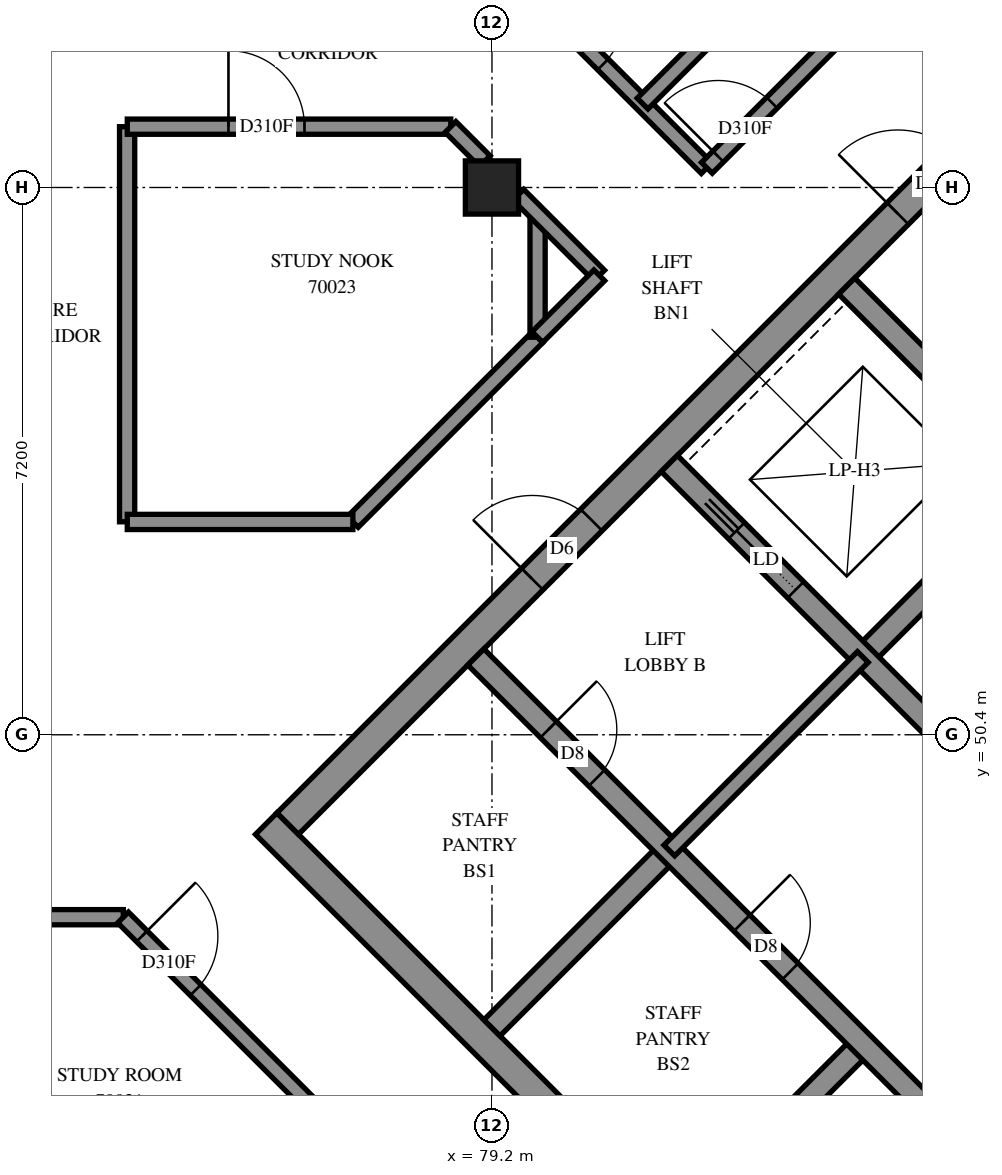
"""IFC4 building model, lengths in metres.
Left out: names, types, materials, properties, quantities, classifications, styles, units other than length and angle.
Written with IfcOpenShell. Run it as: python <this file> out.ifc"""

import sys

from ifc_helpers import new_model, si_unit, direction, frame, frame_2d, origin, origin_2d, place, context, subcontext, project, spatial, rectangle, extrude, element, fill, save


model = new_model("IFC4")
c1 = context("Model", 3, precision=1e-05, world=origin(), true_north=direction((0.0, 1.0)))
c2 = subcontext(c1, "Body", "Model", "MODEL_VIEW")
j1 = project(units=[si_unit("LENGTHUNIT", "METRE"), si_unit("PLANEANGLEUNIT", "RADIAN")], contexts=[c1])
p1 = place(None, origin())
s1 = spatial("IfcSite", under=j1, at=p1, CompositionType="ELEMENT")
p2 = place(p1, origin())
s2 = spatial("IfcBuilding", under=s1, at=p2, CompositionType="ELEMENT")
p3 = place(p2, frame((0.0, 0.0, 257.4)))
s3 = spatial("IfcBuildingStorey", under=s2, at=p3, CompositionType="ELEMENT", Elevation=257.4)
p4 = place(p3, frame((79.2, 57.6, 0.0), z_axis=(0.0, 0.0, 1.0), x_axis=(1.0, 0.0, 0.0)))
e1 = element("IfcColumn", 1, at=p4, inside=s3, PredefinedType="COLUMN", context=c2, shape_type="SweptSolid", body=[
    extrude(rectangle(XDim=0.7, YDim=0.7, at=origin_2d()), origin(), (0.0, 0.0, 1.0), 3.1),
])
p5 = place(p3, frame((76.23, 49.231, -0.3), z_axis=(0.0, 0.0, 1.0), x_axis=(0.7071034917, -0.7071100706, 0.0)))
e2 = element("IfcWall", 2, at=p5, inside=s3, PredefinedType="SHEAR", context=c2, shape_type="SweptSolid", body=[
    extrude(rectangle(XDim=15.2, YDim=0.4, at=frame_2d((7.6, 0.0))), origin(), (0.0, 0.0, 1.0), 2.7),
])
p6 = place(p3, frame((76.513, 49.231, -0.3), z_axis=(0.0, 0.0, 1.0), x_axis=(0.7071067812, 0.7071067812, 0.0)))
e3 = element("IfcWall", 3, at=p6, inside=s3, PredefinedType="SHEAR", context=c2, shape_type="SweptSolid", body=[
    extrude(rectangle(XDim=14.4, YDim=0.4, at=frame_2d((7.2, 0.0))), origin(), (0.0, 0.0, 1.0), 2.7),
])
p7 = place(p6, frame((4.55, 0.0, 0.3)))
e4 = element("IfcOpeningElement", 4, at=p7, cuts=e3, PredefinedType="OPENING", context=c2, shape_type="SweptSolid", body=[
    extrude(rectangle(XDim=1.1, YDim=2.1, at=frame_2d((0.55, 1.05))), frame((0.0, 0.21, 0.0), z_axis=(0.0, -1.0, 0.0), x_axis=(1.0, 0.0, 0.0)), (0.0, 0.0, 1.0), 0.42),
])
p8 = place(p6, frame((11.35, 0.0, 0.3)))
e5 = element("IfcOpeningElement", 5, at=p8, cuts=e3, PredefinedType="OPENING", context=c2, shape_type="SweptSolid", body=[
    extrude(rectangle(XDim=1.1, YDim=2.1, at=frame_2d((0.55, 1.05))), frame((0.0, 0.21, 0.0), z_axis=(0.0, -1.0, 0.0), x_axis=(1.0, 0.0, 0.0)), (0.0, 0.0, 1.0), 0.42),
])
for number, where, z_axis, x_axis in (
    (6, (79.2, 46.544, 0.0), (0.0, 0.0, 1.0), (0.707, 0.707, 0.0)),
    (7, (84.079, 51.423, 0.0), (0.0, 0.0, 1.0), (0.707, 0.707, 0.0)),
):
    element("IfcWall", number, at=place(p3, frame(where, z_axis=z_axis, x_axis=x_axis)), inside=s3, PredefinedType="SOLIDWALL", context=c2, shape_type="SweptSolid", body=[
        extrude(rectangle(XDim=3.3, YDim=0.3, at=frame_2d((1.65, 0.0))), origin(), (0.0, 0.0, 1.0), 3.1),
    ])
p9 = place(p3, frame((81.746, 43.999, 0.0), z_axis=(0.0, 0.0, 1.0), x_axis=(0.7071067812, 0.7071067812, 0.0)))
e8 = element("IfcWall", 8, at=p9, inside=s3, PredefinedType="SOLIDWALL", context=c2, shape_type="SweptSolid", body=[
    extrude(rectangle(XDim=3.3, YDim=0.3, at=frame_2d((1.65, 0.0))), origin(), (0.0, 0.0, 1.0), 3.1),
])
p10 = place(p3, frame((78.988, 51.423, 0.0), z_axis=(0.0, 0.0, 1.0), x_axis=(0.7071067812, -0.7071067812, 0.0)))
e9 = element("IfcWall", 9, at=p10, inside=s3, PredefinedType="SOLIDWALL", context=c2, shape_type="SweptSolid", body=[
    extrude(rectangle(XDim=14.4, YDim=0.3, at=frame_2d((7.2, 0.0))), origin(), (0.0, 0.0, 1.0), 3.1),
])
p11 = place(p10, frame((1.35, 0.0, 0.0)))
e10 = element("IfcOpeningElement", 10, at=p11, cuts=e9, PredefinedType="OPENING", context=c2, shape_type="SweptSolid", body=[
    extrude(rectangle(XDim=0.9, YDim=2.1, at=frame_2d((0.45, 1.05))), frame((0.0, 0.16, 0.0), z_axis=(0.0, -1.0, 0.0), x_axis=(1.0, 0.0, 0.0)), (0.0, 0.0, 1.0), 0.32),
])
p12 = place(p10, frame((4.95, 0.0, 0.0)))
e11 = element("IfcOpeningElement", 11, at=p12, cuts=e9, PredefinedType="OPENING", context=c2, shape_type="SweptSolid", body=[
    extrude(rectangle(XDim=0.9, YDim=2.1, at=frame_2d((0.45, 1.05))), frame((0.0, 0.16, 0.0), z_axis=(0.0, -1.0, 0.0), x_axis=(1.0, 0.0, 0.0)), (0.0, 0.0, 1.0), 0.32),
])
p13 = place(p10, frame((8.55, 0.0, 0.0)))
e12 = element("IfcOpeningElement", 12, at=p13, cuts=e9, PredefinedType="OPENING", context=c2, shape_type="SweptSolid", body=[
    extrude(rectangle(XDim=0.9, YDim=2.1, at=frame_2d((0.45, 1.05))), frame((0.0, 0.16, 0.0), z_axis=(0.0, -1.0, 0.0), x_axis=(1.0, 0.0, 0.0)), (0.0, 0.0, 1.0), 0.32),
])
p14 = place(p10, frame((12.05, 0.0, 0.0)))
e13 = element("IfcOpeningElement", 13, at=p14, cuts=e9, PredefinedType="OPENING", context=c2, shape_type="SweptSolid", body=[
    extrude(rectangle(XDim=1.1, YDim=2.1, at=frame_2d((0.55, 1.05))), frame((0.0, 0.16, 0.0), z_axis=(0.0, -1.0, 0.0), x_axis=(1.0, 0.0, 0.0)), (0.0, 0.0, 1.0), 0.32),
])
p15 = place(p3, frame((81.534, 53.969, 0.0), z_axis=(0.0, 0.0, 1.0), x_axis=(0.707103309, -0.7071102534, 0.0)))
e14 = element("IfcWall", 14, at=p15, inside=s3, PredefinedType="SOLIDWALL", context=c2, shape_type="SweptSolid", body=[
    extrude(rectangle(XDim=14.4, YDim=0.3, at=frame_2d((7.2, 0.0))), origin(), (0.0, 0.0, 1.0), 3.1),
])
p16 = place(p15, frame((8.55, 0.0, 0.0)))
e15 = element("IfcOpeningElement", 15, at=p16, cuts=e14, PredefinedType="OPENING", context=c2, shape_type="SweptSolid", body=[
    extrude(rectangle(XDim=0.9, YDim=2.1, at=frame_2d((0.45, 1.05))), frame((0.0, 0.16, 0.0), z_axis=(0.0, -1.0, 0.0), x_axis=(1.0, 0.0, 0.0)), (0.0, 0.0, 1.0), 0.32),
])
p17 = place(p15, frame((1.25, 0.0, 0.0)))
e16 = element("IfcOpeningElement", 16, at=p17, cuts=e14, PredefinedType="OPENING", context=c2, shape_type="SweptSolid", body=[
    extrude(rectangle(XDim=1.1, YDim=2.1, at=frame_2d((0.55, 1.05))), frame((0.0, 0.16, 0.0), z_axis=(0.0, -1.0, 0.0), x_axis=(1.0, 0.0, 0.0)), (0.0, 0.0, 1.0), 0.32),
])
p18 = place(p15, frame((4.85, 0.0, 0.0)))
e17 = element("IfcOpeningElement", 17, at=p18, cuts=e14, PredefinedType="OPENING", context=c2, shape_type="SweptSolid", body=[
    extrude(rectangle(XDim=1.1, YDim=2.1, at=frame_2d((0.55, 1.05))), frame((0.0, 0.16, 0.0), z_axis=(0.0, -1.0, 0.0), x_axis=(1.0, 0.0, 0.0)), (0.0, 0.0, 1.0), 0.32),
])
p19 = place(p15, frame((12.05, 0.0, 0.0)))
e18 = element("IfcOpeningElement", 18, at=p19, cuts=e14, PredefinedType="OPENING", context=c2, shape_type="SweptSolid", body=[
    extrude(rectangle(XDim=1.1, YDim=2.1, at=frame_2d((0.55, 1.05))), frame((0.0, 0.16, 0.0), z_axis=(0.0, -1.0, 0.0), x_axis=(1.0, 0.0, 0.0)), (0.0, 0.0, 1.0), 0.32),
])
p20 = place(p3, frame((83.867, 56.302, 0.0), z_axis=(0.0, 0.0, 1.0), x_axis=(0.7071137256, -0.7070998367, 0.0)))
e19 = element("IfcWall", 19, at=p20, inside=s3, PredefinedType="SOLIDWALL", context=c2, shape_type="SweptSolid", body=[
    extrude(rectangle(XDim=7.2, YDim=0.3, at=frame_2d((3.6, 0.0))), origin(), (0.0, 0.0, 1.0), 3.1),
])
p21 = place(p3, frame((81.534, 48.878, 0.0), z_axis=(0.0, 0.0, 1.0), x_axis=(0.707092892, 0.7071206701, 0.0)))
e20 = element("IfcWall", 20, at=p21, inside=s3, PredefinedType="PARTITIONING", context=c2, shape_type="SweptSolid", body=[
    extrude(rectangle(XDim=3.6, YDim=0.2, at=frame_2d((1.8, 0.0))), origin(), (0.0, 0.0, 1.0), 3.1),
])
p22 = place(p3, frame((55.2, 48.0, 0.0), z_axis=(0.0, 0.0, 1.0), x_axis=(1.0, 0.0, 0.0)))
e21 = element("IfcWall", 21, at=p22, inside=s3, PredefinedType="PARTITIONING", context=c2, shape_type="SweptSolid", body=[
    extrude(rectangle(XDim=19.15, YDim=0.2, at=frame_2d((9.575, 0.0))), origin(), (0.0, 0.0, 1.0), 3.1),
])
p23 = place(p22, frame((6.343, 0.0, 0.0)))
e22 = element("IfcOpeningElement", 22, at=p23, cuts=e21, PredefinedType="OPENING", context=c2, shape_type="SweptSolid", body=[
    extrude(rectangle(XDim=0.9, YDim=2.1, at=frame_2d((0.45, 1.05))), frame((0.0, 0.11, 0.0), z_axis=(0.0, -1.0, 0.0), x_axis=(1.0, 0.0, 0.0)), (0.0, 0.0, 1.0), 0.22),
])
p24 = place(p22, frame((11.633, 0.0, 0.0)))
e23 = element("IfcOpeningElement", 23, at=p24, cuts=e21, PredefinedType="OPENING", context=c2, shape_type="SweptSolid", body=[
    extrude(rectangle(XDim=1.0, YDim=2.1, at=frame_2d((0.5, 1.05))), frame((0.0, 0.11, 0.0), z_axis=(0.0, -1.0, 0.0), x_axis=(1.0, 0.0, 0.0)), (0.0, 0.0, 1.0), 0.22),
])
p25 = place(p22, frame((13.707, 0.0, 0.0)))
e24 = element("IfcOpeningElement", 24, at=p25, cuts=e21, PredefinedType="OPENING", context=c2, shape_type="SweptSolid", body=[
    extrude(rectangle(XDim=1.0, YDim=2.1, at=frame_2d((0.5, 1.05))), frame((0.0, 0.11, 0.0), z_axis=(0.0, -1.0, 0.0), x_axis=(1.0, 0.0, 0.0)), (0.0, 0.0, 1.0), 0.22),
])
p26 = place(p3, frame((74.397, 65.483, 0.0), z_axis=(0.0, 0.0, 1.0), x_axis=(0.7071067812, -0.7071067812, 0.0)))
e25 = element("IfcWall", 25, at=p26, inside=s3, PredefinedType="PARTITIONING", context=c2, shape_type="SweptSolid", body=[
    extrude(rectangle(XDim=10.788, YDim=0.2, at=frame_2d((5.394, 0.0))), origin(), (0.0, 0.0, 1.0), 3.1),
])
p27 = place(p26, frame((5.083, 0.0, 0.0)))
e26 = element("IfcOpeningElement", 26, at=p27, cuts=e25, PredefinedType="OPENING", context=c2, shape_type="SweptSolid", body=[
    extrude(rectangle(XDim=1.0, YDim=2.1, at=frame_2d((0.5, 1.05))), frame((0.0, 0.11, 0.0), z_axis=(0.0, -1.0, 0.0), x_axis=(1.0, 0.0, 0.0)), (0.0, 0.0, 1.0), 0.22),
])
p28 = place(p26, frame((7.858, 0.0, 0.0)))
e27 = element("IfcOpeningElement", 27, at=p28, cuts=e25, PredefinedType="OPENING", context=c2, shape_type="SweptSolid", body=[
    extrude(rectangle(XDim=1.0, YDim=2.1, at=frame_2d((0.5, 1.05))), frame((0.0, 0.11, 0.0), z_axis=(0.0, -1.0, 0.0), x_axis=(1.0, 0.0, 0.0)), (0.0, 0.0, 1.0), 0.22),
])
p29 = place(p3, frame((81.182, 58.704, 0.0), z_axis=(0.0, 0.0, 1.0), x_axis=(0.7069952238, 0.707218321, 0.0)))
e28 = element("IfcWall", 28, at=p29, inside=s3, PredefinedType="PARTITIONING", context=c2, shape_type="SweptSolid", body=[
    extrude(rectangle(XDim=8.965, YDim=0.2, at=frame_2d((4.482, 0.0))), origin(), (0.0, 0.0, 1.0), 3.1),
])
p30 = place(p3, frame((82.028, 57.858, 0.0), z_axis=(0.0, 0.0, 1.0), x_axis=(0.7071067812, 0.7071067812, 0.0)))
e29 = element("IfcWall", 29, at=p30, inside=s3, PredefinedType="PARTITIONING", context=c2, shape_type="SweptSolid", body=[
    extrude(rectangle(XDim=6.8, YDim=0.2, at=frame_2d((3.4, 0.0))), origin(), (0.0, 0.0, 1.0), 3.1),
])
p31 = place(p30, frame((0.211, 0.0, 0.0)))
e30 = element("IfcOpeningElement", 30, at=p31, cuts=e29, PredefinedType="OPENING", context=c2, shape_type="SweptSolid", body=[
    extrude(rectangle(XDim=1.0, YDim=2.1, at=frame_2d((0.5, 1.05))), frame((0.0, 0.11, 0.0), z_axis=(0.0, -1.0, 0.0), x_axis=(1.0, 0.0, 0.0)), (0.0, 0.0, 1.0), 0.22),
])
p32 = place(p3, frame((74.4, 53.202, 0.0), z_axis=(0.0, 0.0, 1.0), x_axis=(0.0, 1.0, 0.0)))
e31 = element("IfcWall", 31, at=p32, inside=s3, PredefinedType="PARTITIONING", context=c2, shape_type="SweptSolid", body=[
    extrude(rectangle(XDim=5.198, YDim=0.2, at=frame_2d((2.599, 0.0))), origin(), (0.0, 0.0, 1.0), 3.1),
])
p33 = place(p3, frame((74.347, 47.997, 0.0), z_axis=(0.0, 0.0, 1.0), x_axis=(0.7071067812, -0.7071067812, 0.0)))
e32 = element("IfcWall", 32, at=p33, inside=s3, PredefinedType="PARTITIONING", context=c2, shape_type="SweptSolid", body=[
    extrude(rectangle(XDim=4.596, YDim=0.2, at=frame_2d((2.298, 0.0))), origin(), (0.0, 0.0, 1.0), 3.1),
])
p34 = place(p33, frame((0.35, 0.0, 0.0)))
e33 = element("IfcOpeningElement", 33, at=p34, cuts=e32, PredefinedType="OPENING", context=c2, shape_type="SweptSolid", body=[
    extrude(rectangle(XDim=1.0, YDim=2.1, at=frame_2d((0.5, 1.05))), frame((0.0, 0.11, 0.0), z_axis=(0.0, -1.0, 0.0), x_axis=(1.0, 0.0, 0.0)), (0.0, 0.0, 1.0), 0.22),
])
p35 = place(p3, frame((74.402, 58.4, 0.0), z_axis=(0.0, 0.0, 1.0), x_axis=(1.0, 0.0, 0.0)))
e34 = element("IfcWall", 34, at=p35, inside=s3, PredefinedType="PARTITIONING", context=c2, shape_type="SweptSolid", body=[
    extrude(rectangle(XDim=4.256, YDim=0.2, at=frame_2d((2.128, 0.0))), origin(), (0.0, 0.0, 1.0), 3.1),
])
p36 = place(p35, frame((1.331, 0.0, 0.0)))
e35 = element("IfcOpeningElement", 35, at=p36, cuts=e34, PredefinedType="OPENING", context=c2, shape_type="SweptSolid", body=[
    extrude(rectangle(XDim=1.0, YDim=2.1, at=frame_2d((0.5, 1.05))), frame((0.0, 0.11, 0.0), z_axis=(0.0, -1.0, 0.0), x_axis=(1.0, 0.0, 0.0)), (0.0, 0.0, 1.0), 0.22),
])
p37 = place(p3, frame((77.37, 53.2, 0.0), z_axis=(0.0, 0.0, 1.0), x_axis=(0.7071067812, 0.7071067812, 0.0)))
e36 = element("IfcWall", 36, at=p37, inside=s3, PredefinedType="PARTITIONING", context=c2, shape_type="SweptSolid", body=[
    extrude(rectangle(XDim=3.437, YDim=0.2, at=frame_2d((1.718, 0.0))), origin(), (0.0, 0.0, 1.0), 3.1),
])
p38 = place(p3, frame((74.402, 53.2, 0.0), z_axis=(0.0, 0.0, 1.0), x_axis=(1.0, 0.0, 0.0)))
e37 = element("IfcWall", 37, at=p38, inside=s3, PredefinedType="PARTITIONING", context=c2, shape_type="SweptSolid", body=[
    extrude(rectangle(XDim=2.968, YDim=0.2, at=frame_2d((1.484, 0.0))), origin(), (0.0, 0.0, 1.0), 3.1),
])
p39 = place(p3, frame((79.8, 55.63, 0.0), z_axis=(0.0, 0.0, 1.0), x_axis=(0.0, 1.0, 0.0)))
e38 = element("IfcWall", 38, at=p39, inside=s3, PredefinedType="PARTITIONING", context=c2, shape_type="SweptSolid", body=[
    extrude(rectangle(XDim=1.628, YDim=0.2, at=frame_2d((0.814, 0.0))), origin(), (0.0, 0.0, 1.0), 3.1),
])
p40 = place(p3, frame((79.547, 57.505, 0.0), z_axis=(0.0, 0.0, 1.0), x_axis=(0.7071067812, -0.7071067812, 0.0)))
e39 = element("IfcWall", 39, at=p40, inside=s3, PredefinedType="PARTITIONING", context=c2, shape_type="SweptSolid", body=[
    extrude(rectangle(XDim=1.505, YDim=0.2, at=frame_2d((0.752, 0.0))), origin(), (0.0, 0.0, 1.0), 3.1),
])
p41 = place(p3, frame((79.798, 55.632, 0.0), z_axis=(0.0, 0.0, 1.0), x_axis=(0.7079759957, 0.7062364969, 0.0)))
e40 = element("IfcWall", 40, at=p41, inside=s3, PredefinedType="PARTITIONING", context=c2, shape_type="SweptSolid", body=[
    extrude(rectangle(XDim=1.15, YDim=0.2, at=frame_2d((0.575, 0.0))), origin(), (0.0, 0.0, 1.0), 3.1),
])
p42 = place(p3, frame((78.655, 58.397, 0.0), z_axis=(0.0, 0.0, 1.0), x_axis=(0.7071067812, -0.7071067812, 0.0)))
e41 = element("IfcWall", 41, at=p42, inside=s3, PredefinedType="PARTITIONING", context=c2, shape_type="SweptSolid", body=[
    extrude(rectangle(XDim=0.636, YDim=0.2, at=frame_2d((0.318, 0.0))), origin(), (0.0, 0.0, 1.0), 3.1),
])
p43 = place(p7, origin())
e42 = element("IfcDoor", 42, at=p43, inside=s3, OperationType="DOUBLE_DOOR_SINGLE_SWING", PredefinedType="DOOR", context=c2, shape_type="SweptSolid", body=[
    extrude(rectangle(XDim=1.1, YDim=2.1, at=frame_2d((0.55, 1.05))), frame((0.0, 0.025, 0.0), z_axis=(0.0, -1.0, 0.0), x_axis=(1.0, 0.0, 0.0)), (0.0, 0.0, 1.0), 0.05),
])
fill(e4, e42)
p44 = place(p8, origin())
e43 = element("IfcDoor", 43, at=p44, inside=s3, OperationType="SINGLE_SWING_LEFT", PredefinedType="DOOR", context=c2, shape_type="SweptSolid", body=[
    extrude(rectangle(XDim=1.1, YDim=2.1, at=frame_2d((0.55, 1.05))), frame((0.0, 0.025, 0.0), z_axis=(0.0, -1.0, 0.0), x_axis=(1.0, 0.0, 0.0)), (0.0, 0.0, 1.0), 0.05),
])
fill(e5, e43)
p45 = place(p11, origin())
e44 = element("IfcDoor", 44, at=p45, inside=s3, OperationType="SINGLE_SWING_LEFT", PredefinedType="DOOR", context=c2, shape_type="SweptSolid", body=[
    extrude(rectangle(XDim=0.9, YDim=2.1, at=frame_2d((0.45, 1.05))), frame((0.0, 0.025, 0.0), z_axis=(0.0, -1.0, 0.0), x_axis=(1.0, 0.0, 0.0)), (0.0, 0.0, 1.0), 0.05),
])
fill(e10, e44)
p46 = place(p12, origin())
e45 = element("IfcDoor", 45, at=p46, inside=s3, OperationType="SINGLE_SWING_LEFT", PredefinedType="DOOR", context=c2, shape_type="SweptSolid", body=[
    extrude(rectangle(XDim=0.9, YDim=2.1, at=frame_2d((0.45, 1.05))), frame((0.0, 0.025, 0.0), z_axis=(0.0, -1.0, 0.0), x_axis=(1.0, 0.0, 0.0)), (0.0, 0.0, 1.0), 0.05),
])
fill(e11, e45)
p47 = place(p17, origin())
e46 = element("IfcDoor", 46, at=p47, inside=s3, OperationType="SLIDING_TO_LEFT", PredefinedType="DOOR", context=c2, shape_type="SweptSolid", body=[
    extrude(rectangle(XDim=1.1, YDim=2.1, at=frame_2d((0.55, 1.05))), frame((0.0, 0.025, 0.0), z_axis=(0.0, -1.0, 0.0), x_axis=(1.0, 0.0, 0.0)), (0.0, 0.0, 1.0), 0.05),
])
fill(e16, e46)
p48 = place(p34, origin())
e47 = element("IfcDoor", 47, at=p48, inside=s3, OperationType="SINGLE_SWING_LEFT", PredefinedType="DOOR", context=c2, shape_type="SweptSolid", body=[
    extrude(rectangle(XDim=1.0, YDim=2.1, at=frame_2d((0.5, 1.05))), frame((0.0, 0.025, 0.0), z_axis=(0.0, -1.0, 0.0), x_axis=(1.0, 0.0, 0.0)), (0.0, 0.0, 1.0), 0.05),
])
fill(e33, e47)
p49 = place(p36, origin())
e48 = element("IfcDoor", 48, at=p49, inside=s3, OperationType="SINGLE_SWING_RIGHT", PredefinedType="DOOR", context=c2, shape_type="SweptSolid", body=[
    extrude(rectangle(XDim=1.0, YDim=2.1, at=frame_2d((0.5, 1.05))), frame((0.0, 0.025, 0.0), z_axis=(0.0, -1.0, 0.0), x_axis=(1.0, 0.0, 0.0)), (0.0, 0.0, 1.0), 0.05),
])
fill(e35, e48)
p50 = place(p28, origin())
e49 = element("IfcDoor", 49, at=p50, inside=s3, OperationType="SINGLE_SWING_LEFT", PredefinedType="DOOR", context=c2, shape_type="SweptSolid", body=[
    extrude(rectangle(XDim=1.0, YDim=2.1, at=frame_2d((0.5, 1.05))), frame((0.0, 0.025, 0.0), z_axis=(0.0, -1.0, 0.0), x_axis=(1.0, 0.0, 0.0)), (0.0, 0.0, 1.0), 0.05),
])
fill(e27, e49)
p51 = place(p31, origin())
e50 = element("IfcDoor", 50, at=p51, inside=s3, OperationType="SINGLE_SWING_RIGHT", PredefinedType="DOOR", context=c2, shape_type="SweptSolid", body=[
    extrude(rectangle(XDim=1.0, YDim=2.1, at=frame_2d((0.5, 1.05))), frame((0.0, 0.025, 0.0), z_axis=(0.0, -1.0, 0.0), x_axis=(1.0, 0.0, 0.0)), (0.0, 0.0, 1.0), 0.05),
])
fill(e30, e50)
save(model, sys.argv[1])
